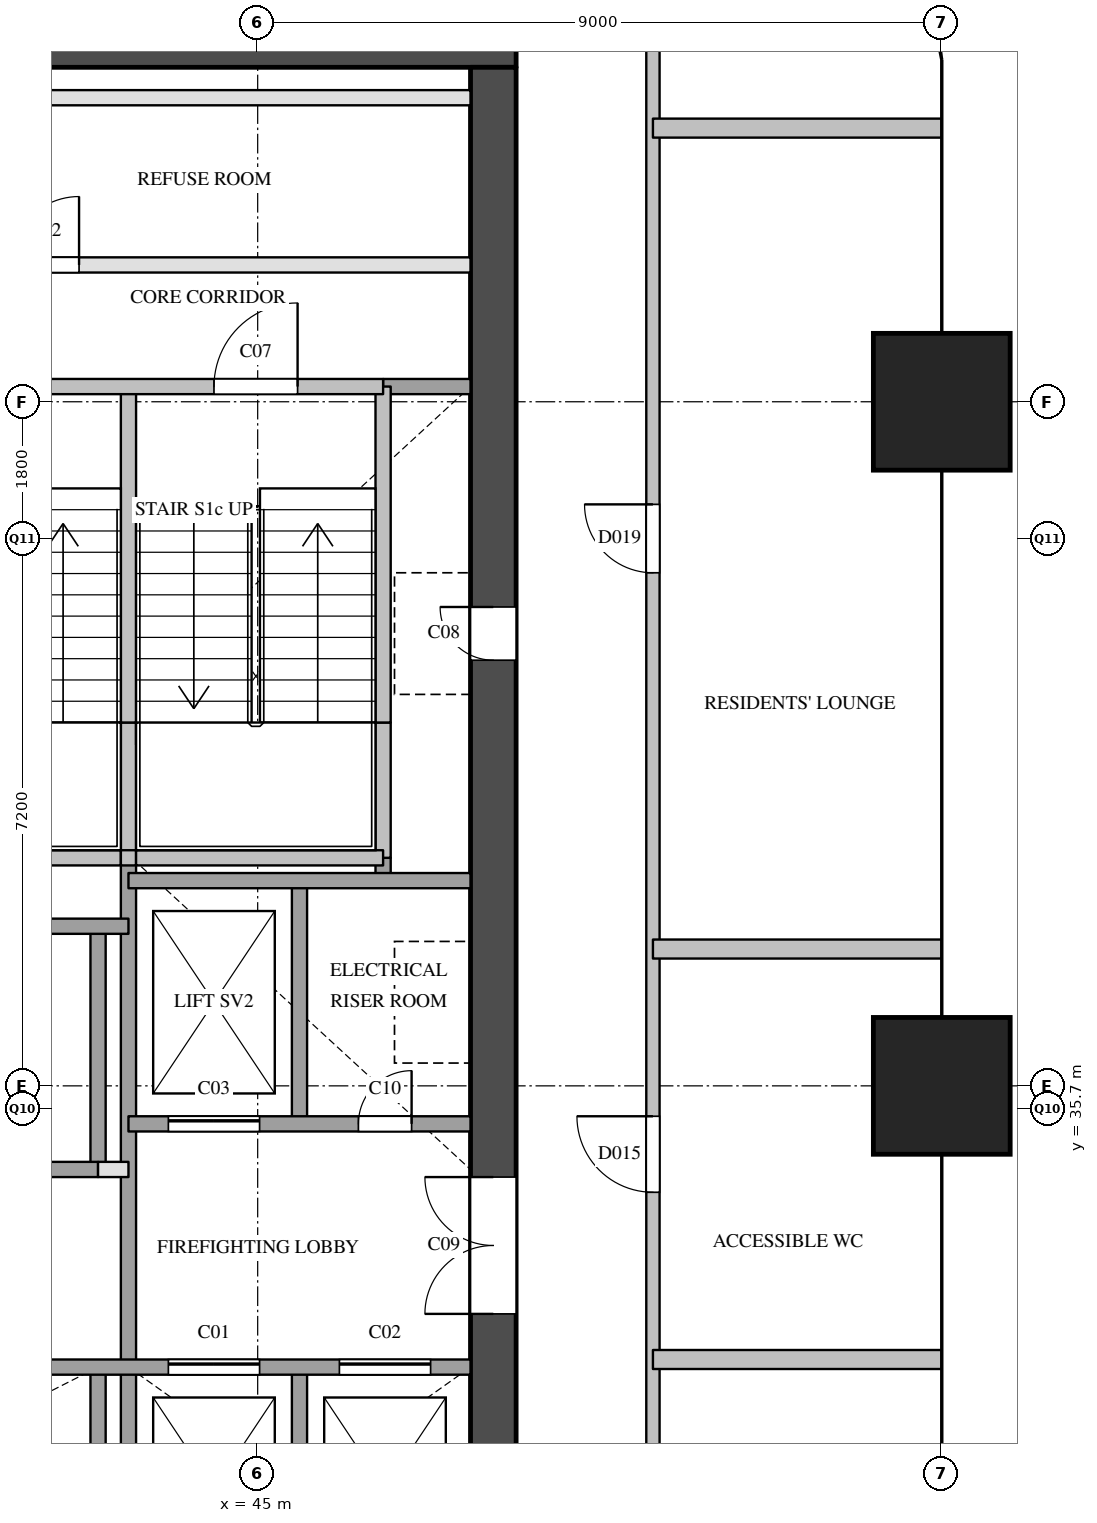
"""IFC4 building model, lengths in metres.
Left out: names, types, materials, properties, quantities, classifications, styles, units other than length and angle.
Written with IfcOpenShell. Run it as: python <this file> out.ifc"""

import sys

from ifc_helpers import new_model, si_unit, direction, frame, frame_2d, origin, origin_2d, place, context, subcontext, project, spatial, rectangle, extrude, element, fill, save


model = new_model("IFC4")
c1 = context("Model", 3, precision=1e-05, world=origin(), true_north=direction((0.0, 1.0)))
c2 = subcontext(c1, "Body", "Model", "MODEL_VIEW")
j1 = project(units=[si_unit("LENGTHUNIT", "METRE"), si_unit("PLANEANGLEUNIT", "RADIAN")], contexts=[c1])
p1 = place(None, origin())
s1 = spatial("IfcSite", under=j1, at=p1, CompositionType="ELEMENT")
p2 = place(p1, origin())
s2 = spatial("IfcBuilding", under=s1, at=p2, CompositionType="ELEMENT")
p3 = place(p2, frame((0.0, 0.0, 89.2)))
s3 = spatial("IfcBuildingStorey", under=s2, at=p3, CompositionType="ELEMENT", Elevation=89.2)
for number, where, z_axis, x_axis in (
    (1, (54.0, 36.0, 0.0), (0.0, 0.0, 1.0), (1.0, 0.0, 0.0)),
    (2, (54.0, 45.0, 0.0), (0.0, 0.0, 1.0), (1.0, 0.0, 0.0)),
):
    element("IfcColumn", number, at=place(p3, frame(where, z_axis=z_axis, x_axis=x_axis)), inside=s3, PredefinedType="COLUMN", context=c2, shape_type="SweptSolid", body=[
        extrude(rectangle(XDim=1.8, YDim=1.8, at=origin_2d()), origin(), (0.0, 0.0, 1.0), 3.8),
    ])
p4 = place(p3, frame((36.0, 49.7, 0.0), z_axis=(0.0, 0.0, 1.0), x_axis=(1.0, 0.0, 0.0)))
e3 = element("IfcWall", 3, at=p4, inside=s3, PredefinedType="SHEAR", context=c2, shape_type="SweptSolid", body=[
    extrude(rectangle(XDim=12.4, YDim=0.6, at=frame_2d((6.2, 0.0))), origin(), (0.0, 0.0, 1.0), 3.5),
])
p5 = place(p3, frame((48.1, 29.1, 0.0), z_axis=(0.0, 0.0, 1.0), x_axis=(0.0, 1.0, 0.0)))
e4 = element("IfcWall", 4, at=p5, inside=s3, PredefinedType="SHEAR", context=c2, shape_type="SweptSolid", body=[
    extrude(rectangle(XDim=20.3, YDim=0.6, at=frame_2d((10.15, 0.0))), origin(), (0.0, 0.0, 1.0), 3.5),
])
p6 = place(p5, frame((12.5, 0.0, 0.0)))
e5 = element("IfcOpeningElement", 5, at=p6, cuts=e4, PredefinedType="OPENING", context=c2, shape_type="SweptSolid", body=[
    extrude(rectangle(XDim=0.7, YDim=2.1, at=frame_2d((0.35, 1.05))), frame((0.0, 0.31, 0.0), z_axis=(0.0, -1.0, 0.0), x_axis=(1.0, 0.0, 0.0)), (0.0, 0.0, 1.0), 0.62),
])
p7 = place(p5, frame((3.9, 0.0, 0.0)))
e6 = element("IfcOpeningElement", 6, at=p7, cuts=e4, PredefinedType="OPENING", context=c2, shape_type="SweptSolid", body=[
    extrude(rectangle(XDim=1.8, YDim=2.1, at=frame_2d((0.9, 1.05))), frame((0.0, 0.31, 0.0), z_axis=(0.0, -1.0, 0.0), x_axis=(1.0, 0.0, 0.0)), (0.0, 0.0, 1.0), 0.62),
])
p8 = place(p3, frame((42.9, 29.1, 0.0), z_axis=(0.0, 0.0, 1.0), x_axis=(0.0, 1.0, 0.0)))
e7 = element("IfcWall", 7, at=p8, inside=s3, PredefinedType="SOLIDWALL", context=c2, shape_type="SweptSolid", body=[
    extrude(rectangle(XDim=3.2, YDim=0.2, at=frame_2d((1.6, 0.0))), origin(), (0.0, 0.0, 1.0), 3.5),
])
p9 = place(p3, frame((42.9, 34.9, 0.0), z_axis=(0.0, 0.0, 1.0), x_axis=(0.0, 1.0, 0.0)))
e8 = element("IfcWall", 8, at=p9, inside=s3, PredefinedType="SOLIDWALL", context=c2, shape_type="SweptSolid", body=[
    extrude(rectangle(XDim=3.2, YDim=0.2, at=frame_2d((1.6, 0.0))), origin(), (0.0, 0.0, 1.0), 3.5),
])
p10 = place(p3, frame((43.3, 29.1, 0.0), z_axis=(0.0, 0.0, 1.0), x_axis=(0.0, 1.0, 0.0)))
e9 = element("IfcWall", 9, at=p10, inside=s3, PredefinedType="SOLIDWALL", context=c2, shape_type="SweptSolid", body=[
    extrude(rectangle(XDim=9.9, YDim=0.2, at=frame_2d((4.95, 0.0))), origin(), (0.0, 0.0, 1.0), 3.5),
])
p11 = place(p3, frame((43.3, 39.0, 0.0), z_axis=(0.0, 0.0, 1.0), x_axis=(0.0, 1.0, 0.0)))
e10 = element("IfcWall", 10, at=p11, inside=s3, PredefinedType="SOLIDWALL", context=c2, shape_type="SweptSolid", body=[
    extrude(rectangle(XDim=1.78, YDim=0.2, at=frame_2d((0.89, 0.0))), origin(), (0.0, 0.0, 1.0), 3.5),
])
p12 = place(p3, frame((43.3, 40.78, 0.0), z_axis=(0.0, 0.0, 1.0), x_axis=(0.0, 1.0, 0.0)))
e11 = element("IfcWall", 11, at=p12, inside=s3, PredefinedType="SOLIDWALL", context=c2, shape_type="SweptSolid", body=[
    extrude(rectangle(XDim=4.42, YDim=0.2, at=frame_2d((2.21, 0.0))), origin(), (0.0, 0.0, 1.0), 3.5),
])
for number, where, z_axis, x_axis in (
    (12, (45.55, 29.1, 0.0), (0.0, 0.0, 1.0), (0.0, 1.0, 0.0)),
    (13, (45.55, 35.5, 0.0), (0.0, 0.0, 1.0), (0.0, 1.0, 0.0)),
):
    element("IfcWall", number, at=place(p3, frame(where, z_axis=z_axis, x_axis=x_axis)), inside=s3, PredefinedType="SOLIDWALL", context=c2, shape_type="SweptSolid", body=[
        extrude(rectangle(XDim=3.2, YDim=0.2, at=frame_2d((1.6, 0.0))), origin(), (0.0, 0.0, 1.0), 3.5),
    ])
p13 = place(p3, frame((46.65, 38.7, 0.0), z_axis=(0.0, 0.0, 1.0), x_axis=(0.0, 1.0, 0.0)))
e14 = element("IfcWall", 14, at=p13, inside=s3, PredefinedType="SOLIDWALL", context=c2, shape_type="SweptSolid", body=[
    extrude(rectangle(XDim=0.3, YDim=0.2, at=frame_2d((0.15, 0.0))), origin(), (0.0, 0.0, 1.0), 3.5),
])
p14 = place(p3, frame((46.65, 39.0, 0.0), z_axis=(0.0, 0.0, 1.0), x_axis=(0.0, 1.0, 0.0)))
e15 = element("IfcWall", 15, at=p14, inside=s3, PredefinedType="SOLIDWALL", context=c2, shape_type="SweptSolid", body=[
    extrude(rectangle(XDim=1.78, YDim=0.2, at=frame_2d((0.89, 0.0))), origin(), (0.0, 0.0, 1.0), 3.5),
])
p15 = place(p3, frame((46.65, 40.78, 0.0), z_axis=(0.0, 0.0, 1.0), x_axis=(0.0, 1.0, 0.0)))
e16 = element("IfcWall", 16, at=p15, inside=s3, PredefinedType="SOLIDWALL", context=c2, shape_type="SweptSolid", body=[
    extrude(rectangle(XDim=4.42, YDim=0.2, at=frame_2d((2.21, 0.0))), origin(), (0.0, 0.0, 1.0), 3.5),
])
p16 = place(p3, frame((36.6, 32.3, 0.0), z_axis=(0.0, 0.0, 1.0), x_axis=(1.0, 0.0, 0.0)))
e17 = element("IfcWall", 17, at=p16, inside=s3, PredefinedType="SOLIDWALL", context=c2, shape_type="SweptSolid", body=[
    extrude(rectangle(XDim=11.2, YDim=0.2, at=frame_2d((5.6, 0.0))), origin(), (0.0, 0.0, 1.0), 3.5),
])
p17 = place(p16, frame((7.225, 0.0, 0.0)))
e18 = element("IfcOpeningElement", 18, at=p17, cuts=e17, PredefinedType="OPENING", context=c2, shape_type="SweptSolid", body=[
    extrude(rectangle(XDim=1.2, YDim=2.1, at=frame_2d((0.6, 1.05))), frame((0.0, 0.11, 0.0), z_axis=(0.0, -1.0, 0.0), x_axis=(1.0, 0.0, 0.0)), (0.0, 0.0, 1.0), 0.22),
])
p18 = place(p16, frame((9.475, 0.0, 0.0)))
e19 = element("IfcOpeningElement", 19, at=p18, cuts=e17, PredefinedType="OPENING", context=c2, shape_type="SweptSolid", body=[
    extrude(rectangle(XDim=1.2, YDim=2.1, at=frame_2d((0.6, 1.05))), frame((0.0, 0.11, 0.0), z_axis=(0.0, -1.0, 0.0), x_axis=(1.0, 0.0, 0.0)), (0.0, 0.0, 1.0), 0.22),
])
p19 = place(p3, frame((42.9, 34.9, 0.0), z_axis=(0.0, 0.0, 1.0), x_axis=(1.0, 0.0, 0.0)))
e20 = element("IfcWall", 20, at=p19, inside=s3, PredefinedType="PARTITIONING", context=c2, shape_type="SweptSolid", body=[
    extrude(rectangle(XDim=0.4, YDim=0.2, at=frame_2d((0.2, 0.0))), origin(), (0.0, 0.0, 1.0), 3.5),
])
p20 = place(p3, frame((36.6, 34.9, 0.0), z_axis=(0.0, 0.0, 1.0), x_axis=(1.0, 0.0, 0.0)))
e21 = element("IfcWall", 21, at=p20, inside=s3, PredefinedType="SOLIDWALL", context=c2, shape_type="SweptSolid", body=[
    extrude(rectangle(XDim=6.3, YDim=0.2, at=frame_2d((3.15, 0.0))), origin(), (0.0, 0.0, 1.0), 3.5),
])
p21 = place(p3, frame((43.3, 35.5, 0.0), z_axis=(0.0, 0.0, 1.0), x_axis=(1.0, 0.0, 0.0)))
e22 = element("IfcWall", 22, at=p21, inside=s3, PredefinedType="SOLIDWALL", context=c2, shape_type="SweptSolid", body=[
    extrude(rectangle(XDim=4.5, YDim=0.2, at=frame_2d((2.25, 0.0))), origin(), (0.0, 0.0, 1.0), 3.5),
])
p22 = place(p21, frame((0.525, 0.0, 0.0)))
e23 = element("IfcOpeningElement", 23, at=p22, cuts=e22, PredefinedType="OPENING", context=c2, shape_type="SweptSolid", body=[
    extrude(rectangle(XDim=1.2, YDim=2.1, at=frame_2d((0.6, 1.05))), frame((0.0, 0.11, 0.0), z_axis=(0.0, -1.0, 0.0), x_axis=(1.0, 0.0, 0.0)), (0.0, 0.0, 1.0), 0.22),
])
p23 = place(p21, frame((3.025, 0.0, 0.0)))
e24 = element("IfcOpeningElement", 24, at=p23, cuts=e22, PredefinedType="OPENING", context=c2, shape_type="SweptSolid", body=[
    extrude(rectangle(XDim=0.7, YDim=2.1, at=frame_2d((0.35, 1.05))), frame((0.0, 0.11, 0.0), z_axis=(0.0, -1.0, 0.0), x_axis=(1.0, 0.0, 0.0)), (0.0, 0.0, 1.0), 0.22),
])
p24 = place(p3, frame((36.6, 38.1, 0.0), z_axis=(0.0, 0.0, 1.0), x_axis=(1.0, 0.0, 0.0)))
e25 = element("IfcWall", 25, at=p24, inside=s3, PredefinedType="SOLIDWALL", context=c2, shape_type="SweptSolid", body=[
    extrude(rectangle(XDim=6.7, YDim=0.2, at=frame_2d((3.35, 0.0))), origin(), (0.0, 0.0, 1.0), 3.5),
])
p25 = place(p3, frame((43.3, 38.7, 0.0), z_axis=(0.0, 0.0, 1.0), x_axis=(1.0, 0.0, 0.0)))
e26 = element("IfcWall", 26, at=p25, inside=s3, PredefinedType="SOLIDWALL", context=c2, shape_type="SweptSolid", body=[
    extrude(rectangle(XDim=4.5, YDim=0.2, at=frame_2d((2.25, 0.0))), origin(), (0.0, 0.0, 1.0), 3.5),
])
p26 = place(p3, frame((40.05, 39.0, 0.0), z_axis=(0.0, 0.0, 1.0), x_axis=(1.0, 0.0, 0.0)))
e27 = element("IfcWall", 27, at=p26, inside=s3, PredefinedType="SOLIDWALL", context=c2, shape_type="SweptSolid", body=[
    extrude(rectangle(XDim=3.15, YDim=0.2, at=frame_2d((1.575, 0.0))), origin(), (0.0, 0.0, 1.0), 3.5),
])
p27 = place(p3, frame((43.2, 39.0, 0.0), z_axis=(0.0, 0.0, 1.0), x_axis=(1.0, 0.0, 0.0)))
e28 = element("IfcWall", 28, at=p27, inside=s3, PredefinedType="SOLIDWALL", context=c2, shape_type="SweptSolid", body=[
    extrude(rectangle(XDim=0.2, YDim=0.2, at=frame_2d((0.1, 0.0))), origin(), (0.0, 0.0, 1.0), 3.5),
])
p28 = place(p3, frame((43.4, 39.0, 0.0), z_axis=(0.0, 0.0, 1.0), x_axis=(1.0, 0.0, 0.0)))
e29 = element("IfcWall", 29, at=p28, inside=s3, PredefinedType="SOLIDWALL", context=c2, shape_type="SweptSolid", body=[
    extrude(rectangle(XDim=3.25, YDim=0.2, at=frame_2d((1.625, 0.0))), origin(), (0.0, 0.0, 1.0), 3.5),
])
p29 = place(p3, frame((46.65, 45.2, 0.0), z_axis=(0.0, 0.0, 1.0), x_axis=(1.0, 0.0, 0.0)))
e30 = element("IfcWall", 30, at=p29, inside=s3, PredefinedType="SOLIDWALL", context=c2, shape_type="SweptSolid", body=[
    extrude(rectangle(XDim=1.15, YDim=0.2, at=frame_2d((0.575, 0.0))), origin(), (0.0, 0.0, 1.0), 3.5),
])
p30 = place(p3, frame((36.6, 45.2, 0.0), z_axis=(0.0, 0.0, 1.0), x_axis=(1.0, 0.0, 0.0)))
e31 = element("IfcWall", 31, at=p30, inside=s3, PredefinedType="SOLIDWALL", context=c2, shape_type="SweptSolid", body=[
    extrude(rectangle(XDim=10.05, YDim=0.2, at=frame_2d((5.025, 0.0))), origin(), (0.0, 0.0, 1.0), 3.5),
])
p31 = place(p30, frame((1.125, 0.0, 0.0)))
e32 = element("IfcOpeningElement", 32, at=p31, cuts=e31, PredefinedType="OPENING", context=c2, shape_type="SweptSolid", body=[
    extrude(rectangle(XDim=1.1, YDim=2.1, at=frame_2d((0.55, 1.05))), frame((0.0, 0.11, 0.0), z_axis=(0.0, -1.0, 0.0), x_axis=(1.0, 0.0, 0.0)), (0.0, 0.0, 1.0), 0.22),
])
p32 = place(p30, frame((4.475, 0.0, 0.0)))
e33 = element("IfcOpeningElement", 33, at=p32, cuts=e31, PredefinedType="OPENING", context=c2, shape_type="SweptSolid", body=[
    extrude(rectangle(XDim=1.1, YDim=2.1, at=frame_2d((0.55, 1.05))), frame((0.0, 0.11, 0.0), z_axis=(0.0, -1.0, 0.0), x_axis=(1.0, 0.0, 0.0)), (0.0, 0.0, 1.0), 0.22),
])
p33 = place(p30, frame((7.825, 0.0, 0.0)))
e34 = element("IfcOpeningElement", 34, at=p33, cuts=e31, PredefinedType="OPENING", context=c2, shape_type="SweptSolid", body=[
    extrude(rectangle(XDim=1.1, YDim=2.1, at=frame_2d((0.55, 1.05))), frame((0.0, 0.11, 0.0), z_axis=(0.0, -1.0, 0.0), x_axis=(1.0, 0.0, 0.0)), (0.0, 0.0, 1.0), 0.22),
])
p34 = place(p3, frame((36.6, 46.8, 0.0), z_axis=(0.0, 0.0, 1.0), x_axis=(1.0, 0.0, 0.0)))
e35 = element("IfcWall", 35, at=p34, inside=s3, PredefinedType="PARTITIONING", context=c2, shape_type="SweptSolid", body=[
    extrude(rectangle(XDim=11.2, YDim=0.2, at=frame_2d((5.6, 0.0))), origin(), (0.0, 0.0, 1.0), 3.5),
])
p35 = place(p34, frame((5.15, 0.0, 0.0)))
e36 = element("IfcOpeningElement", 36, at=p35, cuts=e35, PredefinedType="OPENING", context=c2, shape_type="SweptSolid", body=[
    extrude(rectangle(XDim=0.9, YDim=2.1, at=frame_2d((0.45, 1.05))), frame((0.0, 0.11, 0.0), z_axis=(0.0, -1.0, 0.0), x_axis=(1.0, 0.0, 0.0)), (0.0, 0.0, 1.0), 0.22),
])
p36 = place(p3, frame((36.6, 49.0, 0.0), z_axis=(0.0, 0.0, 1.0), x_axis=(1.0, 0.0, 0.0)))
e37 = element("IfcWall", 37, at=p36, inside=s3, PredefinedType="PARTITIONING", context=c2, shape_type="SweptSolid", body=[
    extrude(rectangle(XDim=11.2, YDim=0.2, at=frame_2d((5.6, 0.0))), origin(), (0.0, 0.0, 1.0), 3.5),
])
p37 = place(p3, frame((50.2, 26.7, 0.0), z_axis=(0.0, 0.0, 1.0), x_axis=(0.0, 1.0, 0.0)))
e38 = element("IfcWall", 38, at=p37, inside=s3, PredefinedType="PARTITIONING", context=c2, shape_type="SweptSolid", body=[
    extrude(rectangle(XDim=25.1, YDim=0.175, at=frame_2d((12.55, 0.0))), origin(), (0.0, 0.0, 1.0), 2.5),
])
p38 = place(p37, frame((2.4, 0.0, 0.0)))
e39 = element("IfcOpeningElement", 39, at=p38, cuts=e38, PredefinedType="OPENING", context=c2, shape_type="SweptSolid", body=[
    extrude(rectangle(XDim=0.9, YDim=2.1, at=frame_2d((0.45, 1.05))), frame((0.0, 0.097, 0.0), z_axis=(0.0, -1.0, 0.0), x_axis=(1.0, 0.0, 0.0)), (0.0, 0.0, 1.0), 0.195),
])
p39 = place(p37, frame((7.9, 0.0, 0.0)))
e40 = element("IfcOpeningElement", 40, at=p39, cuts=e38, PredefinedType="OPENING", context=c2, shape_type="SweptSolid", body=[
    extrude(rectangle(XDim=1.0, YDim=2.1, at=frame_2d((0.5, 1.05))), frame((0.0, 0.097, 0.0), z_axis=(0.0, -1.0, 0.0), x_axis=(1.0, 0.0, 0.0)), (0.0, 0.0, 1.0), 0.195),
])
p40 = place(p37, frame((16.05, 0.0, 0.0)))
e41 = element("IfcOpeningElement", 41, at=p40, cuts=e38, PredefinedType="OPENING", context=c2, shape_type="SweptSolid", body=[
    extrude(rectangle(XDim=0.9, YDim=2.1, at=frame_2d((0.45, 1.05))), frame((0.0, 0.097, 0.0), z_axis=(0.0, -1.0, 0.0), x_axis=(1.0, 0.0, 0.0)), (0.0, 0.0, 1.0), 0.195),
])
for number, where, z_axis, x_axis in (
    (42, (50.2, 32.4, 0.0), (0.0, 0.0, 1.0), (1.0, 0.0, 0.0)),
    (43, (50.2, 37.8, 0.0), (0.0, 0.0, 1.0), (1.0, 0.0, 0.0)),
    (44, (50.2, 48.6, 0.0), (0.0, 0.0, 1.0), (1.0, 0.0, 0.0)),
):
    element("IfcWall", number, at=place(p3, frame(where, z_axis=z_axis, x_axis=x_axis)), inside=s3, PredefinedType="PARTITIONING", context=c2, shape_type="SweptSolid", body=[
        extrude(rectangle(XDim=3.8, YDim=0.25, at=frame_2d((1.9, 0.0))), origin(), (0.0, 0.0, 1.0), 2.5),
    ])
p41 = place(p17, origin())
e45 = element("IfcDoor", 45, at=p41, inside=s3, OperationType="SLIDING_TO_LEFT", PredefinedType="DOOR", context=c2, shape_type="SweptSolid", body=[
    extrude(rectangle(XDim=1.2, YDim=2.1, at=frame_2d((0.6, 1.05))), frame((0.0, 0.025, 0.0), z_axis=(0.0, -1.0, 0.0), x_axis=(1.0, 0.0, 0.0)), (0.0, 0.0, 1.0), 0.05),
])
fill(e18, e45)
p42 = place(p18, origin())
e46 = element("IfcDoor", 46, at=p42, inside=s3, OperationType="SLIDING_TO_LEFT", PredefinedType="DOOR", context=c2, shape_type="SweptSolid", body=[
    extrude(rectangle(XDim=1.2, YDim=2.1, at=frame_2d((0.6, 1.05))), frame((0.0, 0.025, 0.0), z_axis=(0.0, -1.0, 0.0), x_axis=(1.0, 0.0, 0.0)), (0.0, 0.0, 1.0), 0.05),
])
fill(e19, e46)
p43 = place(p22, origin())
e47 = element("IfcDoor", 47, at=p43, inside=s3, OperationType="SLIDING_TO_LEFT", PredefinedType="DOOR", context=c2, shape_type="SweptSolid", body=[
    extrude(rectangle(XDim=1.2, YDim=2.1, at=frame_2d((0.6, 1.05))), frame((0.0, 0.025, 0.0), z_axis=(0.0, -1.0, 0.0), x_axis=(1.0, 0.0, 0.0)), (0.0, 0.0, 1.0), 0.05),
])
fill(e23, e47)
p44 = place(p33, origin())
e48 = element("IfcDoor", 48, at=p44, inside=s3, OperationType="SINGLE_SWING_RIGHT", PredefinedType="DOOR", context=c2, shape_type="SweptSolid", body=[
    extrude(rectangle(XDim=1.1, YDim=2.1, at=frame_2d((0.55, 1.05))), frame((0.0, 0.025, 0.0), z_axis=(0.0, -1.0, 0.0), x_axis=(1.0, 0.0, 0.0)), (0.0, 0.0, 1.0), 0.05),
])
fill(e34, e48)
p45 = place(p6, origin())
e49 = element("IfcDoor", 49, at=p45, inside=s3, OperationType="SINGLE_SWING_RIGHT", PredefinedType="DOOR", context=c2, shape_type="SweptSolid", body=[
    extrude(rectangle(XDim=0.7, YDim=2.1, at=frame_2d((0.35, 1.05))), frame((0.0, 0.025, 0.0), z_axis=(0.0, -1.0, 0.0), x_axis=(1.0, 0.0, 0.0)), (0.0, 0.0, 1.0), 0.05),
])
fill(e5, e49)
p46 = place(p7, origin())
e50 = element("IfcDoor", 50, at=p46, inside=s3, OperationType="DOUBLE_DOOR_SINGLE_SWING", PredefinedType="DOOR", context=c2, shape_type="SweptSolid", body=[
    extrude(rectangle(XDim=1.8, YDim=2.1, at=frame_2d((0.9, 1.05))), frame((0.0, 0.025, 0.0), z_axis=(0.0, -1.0, 0.0), x_axis=(1.0, 0.0, 0.0)), (0.0, 0.0, 1.0), 0.05),
])
fill(e6, e50)
p47 = place(p23, origin())
e51 = element("IfcDoor", 51, at=p47, inside=s3, OperationType="SINGLE_SWING_RIGHT", PredefinedType="DOOR", context=c2, shape_type="SweptSolid", body=[
    extrude(rectangle(XDim=0.7, YDim=2.1, at=frame_2d((0.35, 1.05))), frame((0.0, 0.025, 0.0), z_axis=(0.0, -1.0, 0.0), x_axis=(1.0, 0.0, 0.0)), (0.0, 0.0, 1.0), 0.05),
])
fill(e24, e51)
p48 = place(p35, origin())
e52 = element("IfcDoor", 52, at=p48, inside=s3, OperationType="SINGLE_SWING_RIGHT", PredefinedType="DOOR", context=c2, shape_type="SweptSolid", body=[
    extrude(rectangle(XDim=0.9, YDim=2.1, at=frame_2d((0.45, 1.05))), frame((0.0, 0.025, 0.0), z_axis=(0.0, -1.0, 0.0), x_axis=(1.0, 0.0, 0.0)), (0.0, 0.0, 1.0), 0.05),
])
fill(e36, e52)
p49 = place(p39, origin())
e53 = element("IfcDoor", 53, at=p49, inside=s3, OperationType="SINGLE_SWING_RIGHT", PredefinedType="DOOR", context=c2, shape_type="SweptSolid", body=[
    extrude(rectangle(XDim=1.0, YDim=2.1, at=frame_2d((0.5, 1.05))), frame((0.0, 0.025, 0.0), z_axis=(0.0, -1.0, 0.0), x_axis=(1.0, 0.0, 0.0)), (0.0, 0.0, 1.0), 0.05),
])
fill(e40, e53)
p50 = place(p40, origin())
e54 = element("IfcDoor", 54, at=p50, inside=s3, OperationType="SINGLE_SWING_RIGHT", PredefinedType="DOOR", context=c2, shape_type="SweptSolid", body=[
    extrude(rectangle(XDim=0.9, YDim=2.1, at=frame_2d((0.45, 1.05))), frame((0.0, 0.025, 0.0), z_axis=(0.0, -1.0, 0.0), x_axis=(1.0, 0.0, 0.0)), (0.0, 0.0, 1.0), 0.05),
])
fill(e41, e54)
save(model, sys.argv[1])
